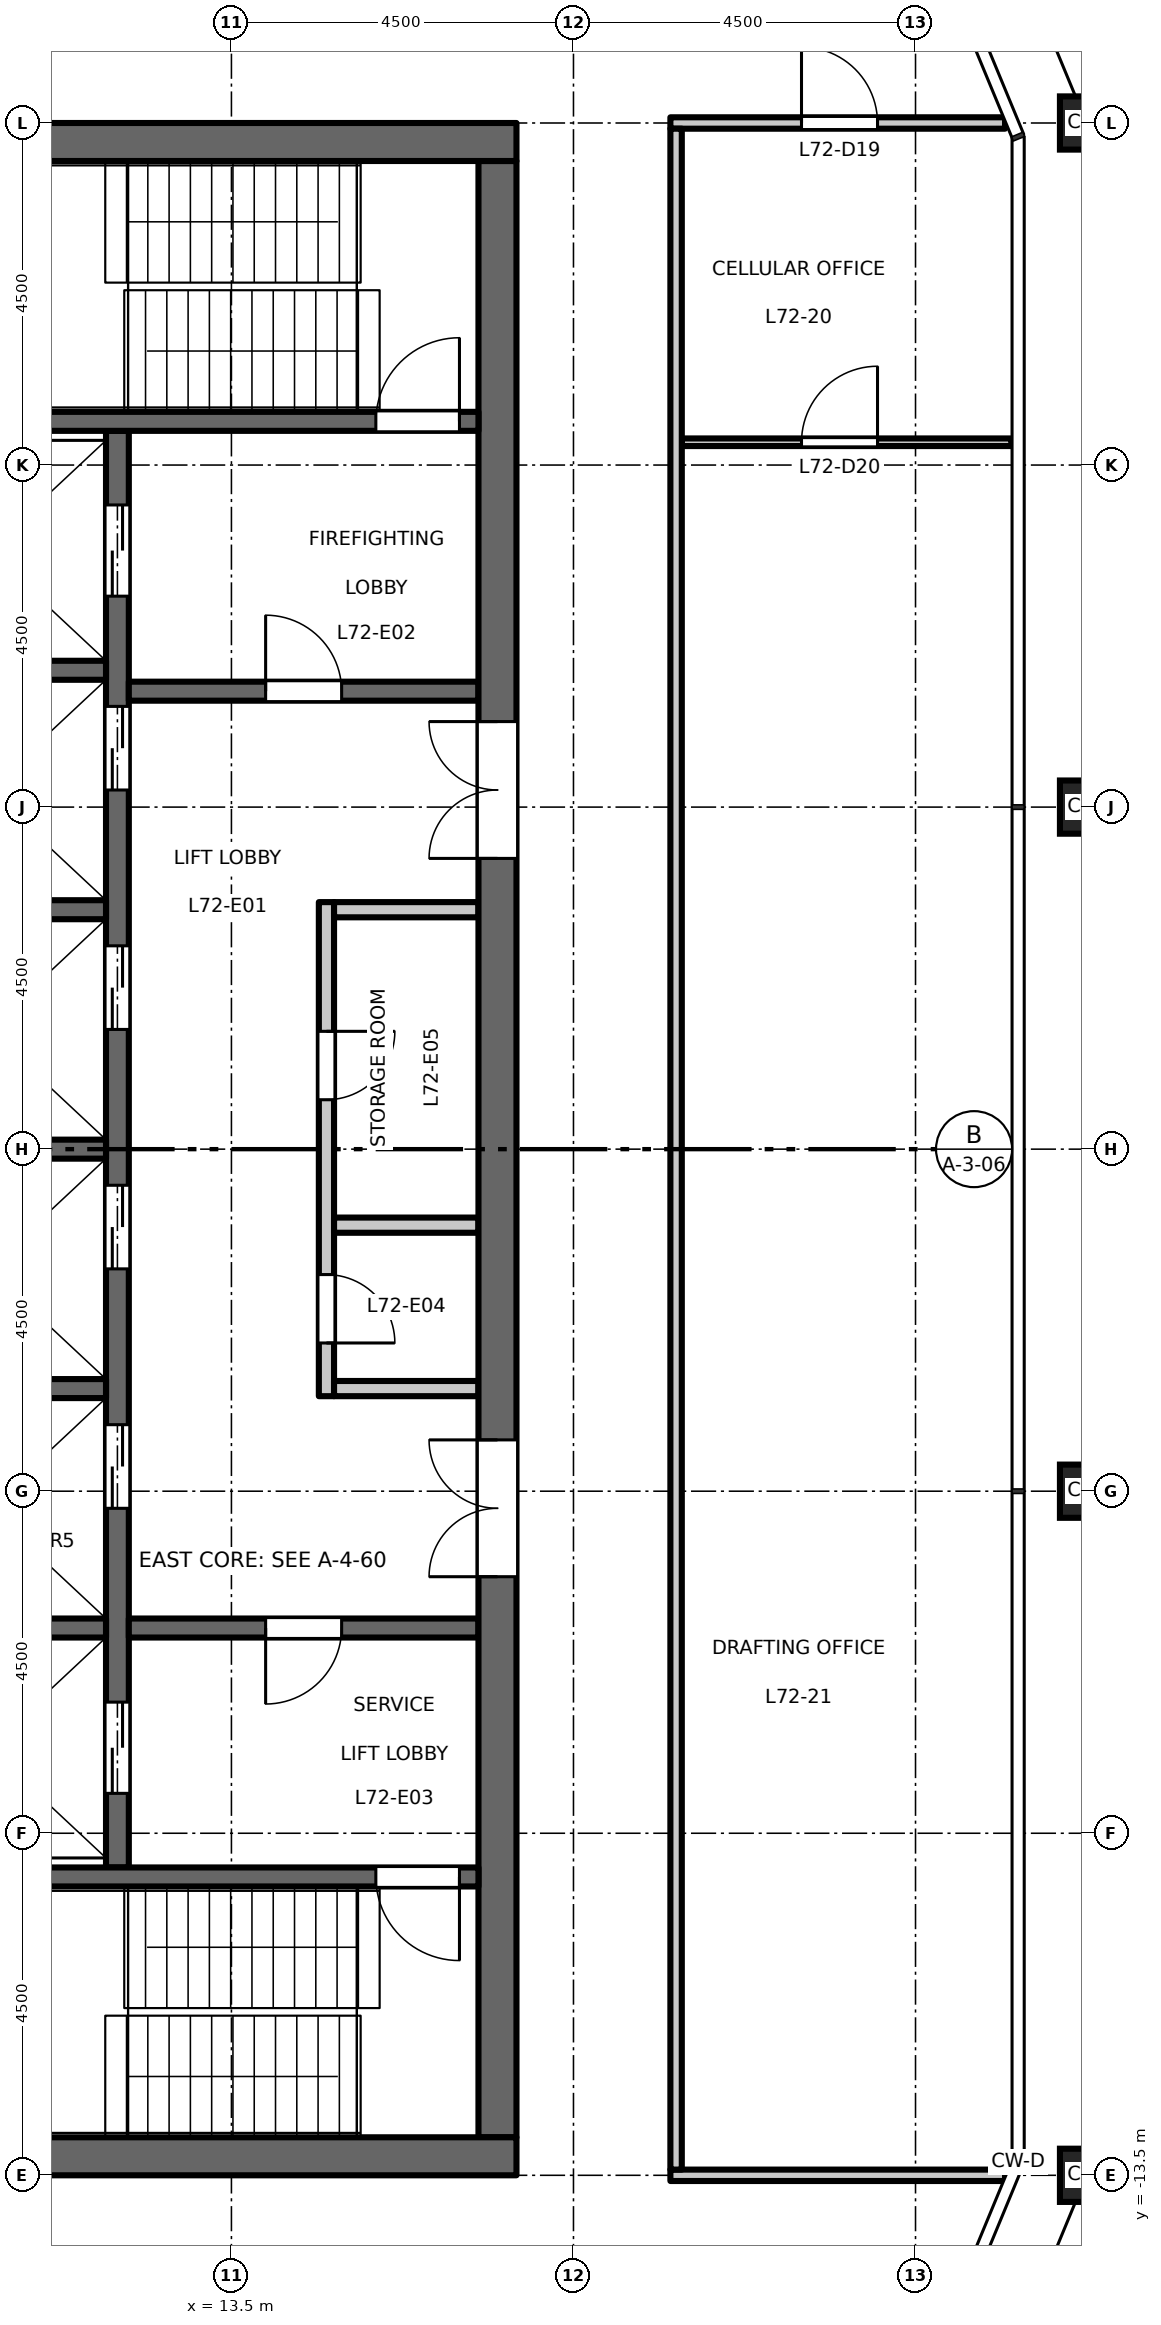
"""IFC4 building model, lengths in metres.
Left out: names, types, materials, properties, quantities, classifications, styles, units other than length and angle.
Written with IfcOpenShell. Run it as: python <this file> out.ifc"""

import sys

from ifc_helpers import new_model, si_unit, direction, frame, frame_2d, origin, origin_2d, place, context, subcontext, project, spatial, rectangle, hollow_rectangle, extrude, element, fill, save


model = new_model("IFC4")
c1 = context("Model", 3, precision=1e-05, world=origin(), true_north=direction((0.0, 1.0)))
c2 = subcontext(c1, "Body", "Model", "MODEL_VIEW")
j1 = project(units=[si_unit("LENGTHUNIT", "METRE"), si_unit("PLANEANGLEUNIT", "RADIAN")], contexts=[c1])
p1 = place(None, origin())
s1 = spatial("IfcSite", under=j1, at=p1, CompositionType="ELEMENT")
p2 = place(p1, origin())
s2 = spatial("IfcBuilding", under=s1, at=p2, CompositionType="ELEMENT")
p3 = place(p2, frame((0.0, 0.0, 334.7)))
s3 = spatial("IfcBuildingStorey", under=s2, at=p3, CompositionType="ELEMENT", Elevation=334.7)
for number, where, z_axis, x_axis in (
    (1, (24.75, -13.5, 0.0), (0.0, 0.0, 1.0), (1.0, 0.0, 0.0)),
    (2, (24.75, -4.5, 0.0), (0.0, 0.0, 1.0), (1.0, 0.0, 0.0)),
    (3, (24.75, 4.5, 0.0), (0.0, 0.0, 1.0), (1.0, 0.0, 0.0)),
    (4, (24.75, 13.5, 0.0), (0.0, 0.0, 1.0), (1.0, 0.0, 0.0)),
):
    element("IfcColumn", number, at=place(p3, frame(where, z_axis=z_axis, x_axis=x_axis)), inside=s3, PredefinedType="COLUMN", context=c2, shape_type="SweptSolid", body=[
        extrude(hollow_rectangle(XDim=0.7, YDim=0.7, WallThickness=0.036, at=origin_2d()), origin(), (0.0, 0.0, 1.0), 4.5),
    ])
p4 = place(p3, frame((14.75, -3.25, 0.0), z_axis=(0.0, 0.0, 1.0), x_axis=(0.0, 1.0, 0.0)))
e5 = element("IfcWall", 5, at=p4, inside=s3, PredefinedType="PARTITIONING", context=c2, shape_type="SweptSolid", body=[
    extrude(rectangle(XDim=6.5, YDim=0.2, at=frame_2d((3.25, 0.0))), origin(), (0.0, 0.0, 1.0), 4.35),
])
p5 = place(p4, frame((0.7, 0.0, 0.0)))
e6 = element("IfcOpeningElement", 6, at=p5, cuts=e5, PredefinedType="OPENING", context=c2, shape_type="SweptSolid", body=[
    extrude(rectangle(XDim=0.9, YDim=2.1, at=frame_2d((0.45, 1.05))), frame((0.0, 0.11, 0.0), z_axis=(0.0, -1.0, 0.0), x_axis=(1.0, 0.0, 0.0)), (0.0, 0.0, 1.0), 0.22),
])
p6 = place(p4, frame((3.9, 0.0, 0.0)))
e7 = element("IfcOpeningElement", 7, at=p6, cuts=e5, PredefinedType="OPENING", context=c2, shape_type="SweptSolid", body=[
    extrude(rectangle(XDim=0.9, YDim=2.1, at=frame_2d((0.45, 1.05))), frame((0.0, 0.11, 0.0), z_axis=(0.0, -1.0, 0.0), x_axis=(1.0, 0.0, 0.0)), (0.0, 0.0, 1.0), 0.22),
])
for number, where, z_axis, x_axis in (
    (8, (14.85, 3.15, 0.0), (0.0, 0.0, 1.0), (1.0, 0.0, 0.0)),
    (9, (14.85, -3.15, 0.0), (0.0, 0.0, 1.0), (1.0, 0.0, 0.0)),
    (10, (14.85, -1.0, 0.0), (0.0, 0.0, 1.0), (1.0, 0.0, 0.0)),
):
    element("IfcWall", number, at=place(p3, frame(where, z_axis=z_axis, x_axis=x_axis)), inside=s3, PredefinedType="PARTITIONING", context=c2, shape_type="SweptSolid", body=[
        extrude(rectangle(XDim=1.9, YDim=0.2, at=frame_2d((0.95, 0.0))), origin(), (0.0, 0.0, 1.0), 4.35),
    ])
p7 = place(p3, frame((12.0, -9.45, 0.0), z_axis=(0.0, 0.0, 1.0), x_axis=(0.0, 1.0, 0.0)))
e11 = element("IfcWall", 11, at=p7, inside=s3, PredefinedType="SHEAR", context=c2, shape_type="SweptSolid", body=[
    extrude(rectangle(XDim=18.9, YDim=0.3, at=frame_2d((9.45, 0.0))), origin(), (0.0, 0.0, 1.0), 4.35),
])
p8 = place(p7, frame((4.725, 0.0, 0.0)))
e12 = element("IfcOpeningElement", 12, at=p8, cuts=e11, PredefinedType="OPENING", context=c2, shape_type="SweptSolid", body=[
    extrude(rectangle(XDim=1.1, YDim=2.1, at=frame_2d((0.55, 1.05))), frame((0.0, 0.16, 0.0), z_axis=(0.0, -1.0, 0.0), x_axis=(1.0, 0.0, 0.0)), (0.0, 0.0, 1.0), 0.32),
])
p9 = place(p7, frame((7.875, 0.0, 0.0)))
e13 = element("IfcOpeningElement", 13, at=p9, cuts=e11, PredefinedType="OPENING", context=c2, shape_type="SweptSolid", body=[
    extrude(rectangle(XDim=1.1, YDim=2.1, at=frame_2d((0.55, 1.05))), frame((0.0, 0.16, 0.0), z_axis=(0.0, -1.0, 0.0), x_axis=(1.0, 0.0, 0.0)), (0.0, 0.0, 1.0), 0.32),
])
p10 = place(p7, frame((11.025, 0.0, 0.0)))
e14 = element("IfcOpeningElement", 14, at=p10, cuts=e11, PredefinedType="OPENING", context=c2, shape_type="SweptSolid", body=[
    extrude(rectangle(XDim=1.1, YDim=2.1, at=frame_2d((0.55, 1.05))), frame((0.0, 0.16, 0.0), z_axis=(0.0, -1.0, 0.0), x_axis=(1.0, 0.0, 0.0)), (0.0, 0.0, 1.0), 0.32),
])
p11 = place(p7, frame((14.175, 0.0, 0.0)))
e15 = element("IfcOpeningElement", 15, at=p11, cuts=e11, PredefinedType="OPENING", context=c2, shape_type="SweptSolid", body=[
    extrude(rectangle(XDim=1.1, YDim=2.1, at=frame_2d((0.55, 1.05))), frame((0.0, 0.16, 0.0), z_axis=(0.0, -1.0, 0.0), x_axis=(1.0, 0.0, 0.0)), (0.0, 0.0, 1.0), 0.32),
])
p12 = place(p7, frame((16.725, 0.0, 0.0)))
e16 = element("IfcOpeningElement", 16, at=p12, cuts=e11, PredefinedType="OPENING", context=c2, shape_type="SweptSolid", body=[
    extrude(rectangle(XDim=1.2, YDim=2.1, at=frame_2d((0.6, 1.05))), frame((0.0, 0.16, 0.0), z_axis=(0.0, -1.0, 0.0), x_axis=(1.0, 0.0, 0.0)), (0.0, 0.0, 1.0), 0.32),
])
p13 = place(p7, frame((0.975, 0.0, 0.0)))
e17 = element("IfcOpeningElement", 17, at=p13, cuts=e11, PredefinedType="OPENING", context=c2, shape_type="SweptSolid", body=[
    extrude(rectangle(XDim=1.2, YDim=2.1, at=frame_2d((0.6, 1.05))), frame((0.0, 0.16, 0.0), z_axis=(0.0, -1.0, 0.0), x_axis=(1.0, 0.0, 0.0)), (0.0, 0.0, 1.0), 0.32),
])
p14 = place(p3, frame((12.15, 6.025, 0.0), z_axis=(0.0, 0.0, 1.0), x_axis=(1.0, 0.0, 0.0)))
e18 = element("IfcWall", 18, at=p14, inside=s3, PredefinedType="SHEAR", context=c2, shape_type="SweptSolid", body=[
    extrude(rectangle(XDim=4.6, YDim=0.25, at=frame_2d((2.3, 0.0))), origin(), (0.0, 0.0, 1.0), 4.35),
])
p15 = place(p14, frame((1.8, 0.0, 0.0)))
e19 = element("IfcOpeningElement", 19, at=p15, cuts=e18, PredefinedType="OPENING", context=c2, shape_type="SweptSolid", body=[
    extrude(rectangle(XDim=1.0, YDim=2.1, at=frame_2d((0.5, 1.05))), frame((0.0, 0.135, 0.0), z_axis=(0.0, -1.0, 0.0), x_axis=(1.0, 0.0, 0.0)), (0.0, 0.0, 1.0), 0.27),
])
p16 = place(p3, frame((12.15, -6.3, 0.0), z_axis=(0.0, 0.0, 1.0), x_axis=(1.0, 0.0, 0.0)))
e20 = element("IfcWall", 20, at=p16, inside=s3, PredefinedType="SHEAR", context=c2, shape_type="SweptSolid", body=[
    extrude(rectangle(XDim=4.6, YDim=0.25, at=frame_2d((2.3, 0.0))), origin(), (0.0, 0.0, 1.0), 4.35),
])
p17 = place(p16, frame((1.8, 0.0, 0.0)))
e21 = element("IfcOpeningElement", 21, at=p17, cuts=e20, PredefinedType="OPENING", context=c2, shape_type="SweptSolid", body=[
    extrude(rectangle(XDim=1.0, YDim=2.1, at=frame_2d((0.5, 1.05))), frame((0.0, 0.135, 0.0), z_axis=(0.0, -1.0, 0.0), x_axis=(1.0, 0.0, 0.0)), (0.0, 0.0, 1.0), 0.27),
])
p18 = place(p3, frame((17.0, -13.0, 0.0), z_axis=(0.0, 0.0, 1.0), x_axis=(0.0, 1.0, 0.0)))
e22 = element("IfcWall", 22, at=p18, inside=s3, PredefinedType="SHEAR", context=c2, shape_type="SweptSolid", body=[
    extrude(rectangle(XDim=26.0, YDim=0.5, at=frame_2d((13.0, 0.0))), origin(), (0.0, 0.0, 1.0), 4.35),
])
p19 = place(p18, frame((16.825, 0.0, 0.0)))
e23 = element("IfcOpeningElement", 23, at=p19, cuts=e22, PredefinedType="OPENING", context=c2, shape_type="SweptSolid", body=[
    extrude(rectangle(XDim=1.8, YDim=2.1, at=frame_2d((0.9, 1.05))), frame((0.0, 0.26, 0.0), z_axis=(0.0, -1.0, 0.0), x_axis=(1.0, 0.0, 0.0)), (0.0, 0.0, 1.0), 0.52),
])
p20 = place(p18, frame((7.375, 0.0, 0.0)))
e24 = element("IfcOpeningElement", 24, at=p20, cuts=e22, PredefinedType="OPENING", context=c2, shape_type="SweptSolid", body=[
    extrude(rectangle(XDim=1.8, YDim=2.1, at=frame_2d((0.9, 1.05))), frame((0.0, 0.26, 0.0), z_axis=(0.0, -1.0, 0.0), x_axis=(1.0, 0.0, 0.0)), (0.0, 0.0, 1.0), 0.52),
])
for number, where, z_axis, x_axis in (
    (25, (8.75, 0.0, 0.0), (0.0, 0.0, 1.0), (1.0, 0.0, 0.0)),
    (26, (8.75, 3.15, 0.0), (0.0, 0.0, 1.0), (1.0, 0.0, 0.0)),
    (27, (8.75, 6.3, 0.0), (0.0, 0.0, 1.0), (1.0, 0.0, 0.0)),
    (28, (8.75, -3.15, 0.0), (0.0, 0.0, 1.0), (1.0, 0.0, 0.0)),
    (29, (8.75, -6.3, 0.0), (0.0, 0.0, 1.0), (1.0, 0.0, 0.0)),
):
    element("IfcWall", number, at=place(p3, frame(where, z_axis=z_axis, x_axis=x_axis)), inside=s3, PredefinedType="SHEAR", context=c2, shape_type="SweptSolid", body=[
        extrude(rectangle(XDim=3.1, YDim=0.25, at=frame_2d((1.55, 0.0))), origin(), (0.0, 0.0, 1.0), 4.35),
    ])
p21 = place(p3, frame((8.75, 9.575, 0.0), z_axis=(0.0, 0.0, 1.0), x_axis=(1.0, 0.0, 0.0)))
e30 = element("IfcWall", 30, at=p21, inside=s3, PredefinedType="SHEAR", context=c2, shape_type="SweptSolid", body=[
    extrude(rectangle(XDim=8.0, YDim=0.25, at=frame_2d((4.0, 0.0))), origin(), (0.0, 0.0, 1.0), 4.35),
])
p22 = place(p21, frame((6.65, 0.0, 0.0)))
e31 = element("IfcOpeningElement", 31, at=p22, cuts=e30, PredefinedType="OPENING", context=c2, shape_type="SweptSolid", body=[
    extrude(rectangle(XDim=1.1, YDim=2.1, at=frame_2d((0.55, 1.05))), frame((0.0, 0.135, 0.0), z_axis=(0.0, -1.0, 0.0), x_axis=(1.0, 0.0, 0.0)), (0.0, 0.0, 1.0), 0.27),
])
p23 = place(p3, frame((8.75, -9.575, 0.0), z_axis=(0.0, 0.0, 1.0), x_axis=(1.0, 0.0, 0.0)))
e32 = element("IfcWall", 32, at=p23, inside=s3, PredefinedType="SHEAR", context=c2, shape_type="SweptSolid", body=[
    extrude(rectangle(XDim=8.0, YDim=0.25, at=frame_2d((4.0, 0.0))), origin(), (0.0, 0.0, 1.0), 4.35),
])
p24 = place(p23, frame((6.65, 0.0, 0.0)))
e33 = element("IfcOpeningElement", 33, at=p24, cuts=e32, PredefinedType="OPENING", context=c2, shape_type="SweptSolid", body=[
    extrude(rectangle(XDim=1.1, YDim=2.1, at=frame_2d((0.55, 1.05))), frame((0.0, 0.135, 0.0), z_axis=(0.0, -1.0, 0.0), x_axis=(1.0, 0.0, 0.0)), (0.0, 0.0, 1.0), 0.27),
])
for number, where, z_axis, x_axis in (
    (34, (8.25, 13.25, 0.0), (0.0, 0.0, 1.0), (1.0, 0.0, 0.0)),
    (35, (8.25, -13.25, 0.0), (0.0, 0.0, 1.0), (1.0, 0.0, 0.0)),
):
    element("IfcWall", number, at=place(p3, frame(where, z_axis=z_axis, x_axis=x_axis)), inside=s3, PredefinedType="SHEAR", context=c2, shape_type="SweptSolid", body=[
        extrude(rectangle(XDim=9.0, YDim=0.5, at=frame_2d((4.5, 0.0))), origin(), (0.0, 0.0, 1.0), 4.35),
    ])
p25 = place(p3, frame((19.275, -13.5, 0.0), z_axis=(0.0, 0.0, 1.0), x_axis=(1.0, 0.0, 0.0)))
e36 = element("IfcWall", 36, at=p25, inside=s3, PredefinedType="PARTITIONING", context=c2, shape_type="SweptSolid", body=[
    extrude(rectangle(XDim=4.403, YDim=0.15, at=frame_2d((2.202, 0.0))), origin(), (0.0, 0.0, 1.0), 4.35),
])
p26 = place(p3, frame((19.425, 9.3, 0.0), z_axis=(0.0, 0.0, 1.0), x_axis=(1.0, 0.0, 0.0)))
e37 = element("IfcWall", 37, at=p26, inside=s3, PredefinedType="PARTITIONING", context=c2, shape_type="SweptSolid", body=[
    extrude(rectangle(XDim=4.335, YDim=0.1, at=frame_2d((2.167, 0.0))), origin(), (0.0, 0.0, 1.0), 4.35),
])
p27 = place(p26, frame((1.575, 0.0, 0.0)))
e38 = element("IfcOpeningElement", 38, at=p27, cuts=e37, PredefinedType="OPENING", context=c2, shape_type="SweptSolid", body=[
    extrude(rectangle(XDim=1.0, YDim=2.1, at=frame_2d((0.5, 1.05))), frame((0.0, 0.06, 0.0), z_axis=(0.0, -1.0, 0.0), x_axis=(1.0, 0.0, 0.0)), (0.0, 0.0, 1.0), 0.12),
])
p28 = place(p3, frame((19.275, 13.5, 0.0), z_axis=(0.0, 0.0, 1.0), x_axis=(1.0, 0.0, 0.0)))
e39 = element("IfcWall", 39, at=p28, inside=s3, PredefinedType="PARTITIONING", context=c2, shape_type="SweptSolid", body=[
    extrude(rectangle(XDim=4.403, YDim=0.15, at=frame_2d((2.202, 0.0))), origin(), (0.0, 0.0, 1.0), 4.35),
])
p29 = place(p28, frame((1.725, 0.0, 0.0)))
e40 = element("IfcOpeningElement", 40, at=p29, cuts=e39, PredefinedType="OPENING", context=c2, shape_type="SweptSolid", body=[
    extrude(rectangle(XDim=1.0, YDim=2.1, at=frame_2d((0.5, 1.05))), frame((0.0, 0.085, 0.0), z_axis=(0.0, -1.0, 0.0), x_axis=(1.0, 0.0, 0.0)), (0.0, 0.0, 1.0), 0.17),
])
p30 = place(p3, frame((19.35, -13.425, 0.0), z_axis=(0.0, 0.0, 1.0), x_axis=(0.0, 1.0, 0.0)))
e41 = element("IfcWall", 41, at=p30, inside=s3, PredefinedType="PARTITIONING", context=c2, shape_type="SweptSolid", body=[
    extrude(rectangle(XDim=26.85, YDim=0.15, at=frame_2d((13.425, 0.0))), origin(), (0.0, 0.0, 1.0), 4.35),
])
p31 = place(p15, origin())
e42 = element("IfcDoor", 42, at=p31, inside=s3, OperationType="SINGLE_SWING_RIGHT", PredefinedType="DOOR", context=c2, shape_type="SweptSolid", body=[
    extrude(rectangle(XDim=1.0, YDim=2.1, at=frame_2d((0.5, 1.05))), frame((0.0, 0.025, 0.0), z_axis=(0.0, -1.0, 0.0), x_axis=(1.0, 0.0, 0.0)), (0.0, 0.0, 1.0), 0.05),
])
fill(e19, e42)
p32 = place(p17, origin())
e43 = element("IfcDoor", 43, at=p32, inside=s3, OperationType="SINGLE_SWING_LEFT", PredefinedType="DOOR", context=c2, shape_type="SweptSolid", body=[
    extrude(rectangle(XDim=1.0, YDim=2.1, at=frame_2d((0.5, 1.05))), frame((0.0, 0.025, 0.0), z_axis=(0.0, -1.0, 0.0), x_axis=(1.0, 0.0, 0.0)), (0.0, 0.0, 1.0), 0.05),
])
fill(e21, e43)
p33 = place(p22, origin())
e44 = element("IfcDoor", 44, at=p33, inside=s3, OperationType="SINGLE_SWING_LEFT", PredefinedType="DOOR", context=c2, shape_type="SweptSolid", body=[
    extrude(rectangle(XDim=1.1, YDim=2.1, at=frame_2d((0.55, 1.05))), frame((0.0, 0.025, 0.0), z_axis=(0.0, -1.0, 0.0), x_axis=(1.0, 0.0, 0.0)), (0.0, 0.0, 1.0), 0.05),
])
fill(e31, e44)
p34 = place(p24, origin())
e45 = element("IfcDoor", 45, at=p34, inside=s3, OperationType="SINGLE_SWING_RIGHT", PredefinedType="DOOR", context=c2, shape_type="SweptSolid", body=[
    extrude(rectangle(XDim=1.1, YDim=2.1, at=frame_2d((0.55, 1.05))), frame((0.0, 0.025, 0.0), z_axis=(0.0, -1.0, 0.0), x_axis=(1.0, 0.0, 0.0)), (0.0, 0.0, 1.0), 0.05),
])
fill(e33, e45)
p35 = place(p19, origin())
e46 = element("IfcDoor", 46, at=p35, inside=s3, OperationType="DOUBLE_DOOR_DOUBLE_SWING", PredefinedType="DOOR", context=c2, shape_type="SweptSolid", body=[
    extrude(rectangle(XDim=1.8, YDim=2.1, at=frame_2d((0.9, 1.05))), frame((0.0, 0.025, 0.0), z_axis=(0.0, -1.0, 0.0), x_axis=(1.0, 0.0, 0.0)), (0.0, 0.0, 1.0), 0.05),
])
fill(e23, e46)
p36 = place(p20, origin())
e47 = element("IfcDoor", 47, at=p36, inside=s3, OperationType="DOUBLE_DOOR_DOUBLE_SWING", PredefinedType="DOOR", context=c2, shape_type="SweptSolid", body=[
    extrude(rectangle(XDim=1.8, YDim=2.1, at=frame_2d((0.9, 1.05))), frame((0.0, 0.025, 0.0), z_axis=(0.0, -1.0, 0.0), x_axis=(1.0, 0.0, 0.0)), (0.0, 0.0, 1.0), 0.05),
])
fill(e24, e47)
p37 = place(p8, origin())
e48 = element("IfcDoor", 48, at=p37, inside=s3, OperationType="DOUBLE_DOOR_SLIDING", PredefinedType="DOOR", context=c2, shape_type="SweptSolid", body=[
    extrude(rectangle(XDim=1.1, YDim=2.1, at=frame_2d((0.55, 1.05))), frame((0.0, 0.025, 0.0), z_axis=(0.0, -1.0, 0.0), x_axis=(1.0, 0.0, 0.0)), (0.0, 0.0, 1.0), 0.05),
])
fill(e12, e48)
p38 = place(p9, origin())
e49 = element("IfcDoor", 49, at=p38, inside=s3, OperationType="DOUBLE_DOOR_SLIDING", PredefinedType="DOOR", context=c2, shape_type="SweptSolid", body=[
    extrude(rectangle(XDim=1.1, YDim=2.1, at=frame_2d((0.55, 1.05))), frame((0.0, 0.025, 0.0), z_axis=(0.0, -1.0, 0.0), x_axis=(1.0, 0.0, 0.0)), (0.0, 0.0, 1.0), 0.05),
])
fill(e13, e49)
p39 = place(p10, origin())
e50 = element("IfcDoor", 50, at=p39, inside=s3, OperationType="DOUBLE_DOOR_SLIDING", PredefinedType="DOOR", context=c2, shape_type="SweptSolid", body=[
    extrude(rectangle(XDim=1.1, YDim=2.1, at=frame_2d((0.55, 1.05))), frame((0.0, 0.025, 0.0), z_axis=(0.0, -1.0, 0.0), x_axis=(1.0, 0.0, 0.0)), (0.0, 0.0, 1.0), 0.05),
])
fill(e14, e50)
p40 = place(p11, origin())
e51 = element("IfcDoor", 51, at=p40, inside=s3, OperationType="DOUBLE_DOOR_SLIDING", PredefinedType="DOOR", context=c2, shape_type="SweptSolid", body=[
    extrude(rectangle(XDim=1.1, YDim=2.1, at=frame_2d((0.55, 1.05))), frame((0.0, 0.025, 0.0), z_axis=(0.0, -1.0, 0.0), x_axis=(1.0, 0.0, 0.0)), (0.0, 0.0, 1.0), 0.05),
])
fill(e15, e51)
p41 = place(p12, origin())
e52 = element("IfcDoor", 52, at=p41, inside=s3, OperationType="DOUBLE_DOOR_SLIDING", PredefinedType="DOOR", context=c2, shape_type="SweptSolid", body=[
    extrude(rectangle(XDim=1.2, YDim=2.1, at=frame_2d((0.6, 1.05))), frame((0.0, 0.025, 0.0), z_axis=(0.0, -1.0, 0.0), x_axis=(1.0, 0.0, 0.0)), (0.0, 0.0, 1.0), 0.05),
])
fill(e16, e52)
p42 = place(p13, origin())
e53 = element("IfcDoor", 53, at=p42, inside=s3, OperationType="DOUBLE_DOOR_SLIDING", PredefinedType="DOOR", context=c2, shape_type="SweptSolid", body=[
    extrude(rectangle(XDim=1.2, YDim=2.1, at=frame_2d((0.6, 1.05))), frame((0.0, 0.025, 0.0), z_axis=(0.0, -1.0, 0.0), x_axis=(1.0, 0.0, 0.0)), (0.0, 0.0, 1.0), 0.05),
])
fill(e17, e53)
p43 = place(p5, origin())
e54 = element("IfcDoor", 54, at=p43, inside=s3, OperationType="SINGLE_SWING_LEFT", PredefinedType="DOOR", context=c2, shape_type="SweptSolid", body=[
    extrude(rectangle(XDim=0.9, YDim=2.1, at=frame_2d((0.45, 1.05))), frame((0.0, 0.025, 0.0), z_axis=(0.0, -1.0, 0.0), x_axis=(1.0, 0.0, 0.0)), (0.0, 0.0, 1.0), 0.05),
])
fill(e6, e54)
p44 = place(p6, origin())
e55 = element("IfcDoor", 55, at=p44, inside=s3, OperationType="SINGLE_SWING_RIGHT", PredefinedType="DOOR", context=c2, shape_type="SweptSolid", body=[
    extrude(rectangle(XDim=0.9, YDim=2.1, at=frame_2d((0.45, 1.05))), frame((0.0, 0.025, 0.0), z_axis=(0.0, -1.0, 0.0), x_axis=(1.0, 0.0, 0.0)), (0.0, 0.0, 1.0), 0.05),
])
fill(e7, e55)
p45 = place(p29, origin())
e56 = element("IfcDoor", 56, at=p45, inside=s3, OperationType="SINGLE_SWING_LEFT", PredefinedType="DOOR", context=c2, shape_type="SweptSolid", body=[
    extrude(rectangle(XDim=1.0, YDim=2.1, at=frame_2d((0.5, 1.05))), frame((0.0, 0.025, 0.0), z_axis=(0.0, -1.0, 0.0), x_axis=(1.0, 0.0, 0.0)), (0.0, 0.0, 1.0), 0.05),
])
fill(e40, e56)
p46 = place(p27, origin())
e57 = element("IfcDoor", 57, at=p46, inside=s3, OperationType="SINGLE_SWING_RIGHT", PredefinedType="DOOR", context=c2, shape_type="SweptSolid", body=[
    extrude(rectangle(XDim=1.0, YDim=2.1, at=frame_2d((0.5, 1.05))), frame((0.0, 0.025, 0.0), z_axis=(0.0, -1.0, 0.0), x_axis=(1.0, 0.0, 0.0)), (0.0, 0.0, 1.0), 0.05),
])
fill(e38, e57)
save(model, sys.argv[1])
